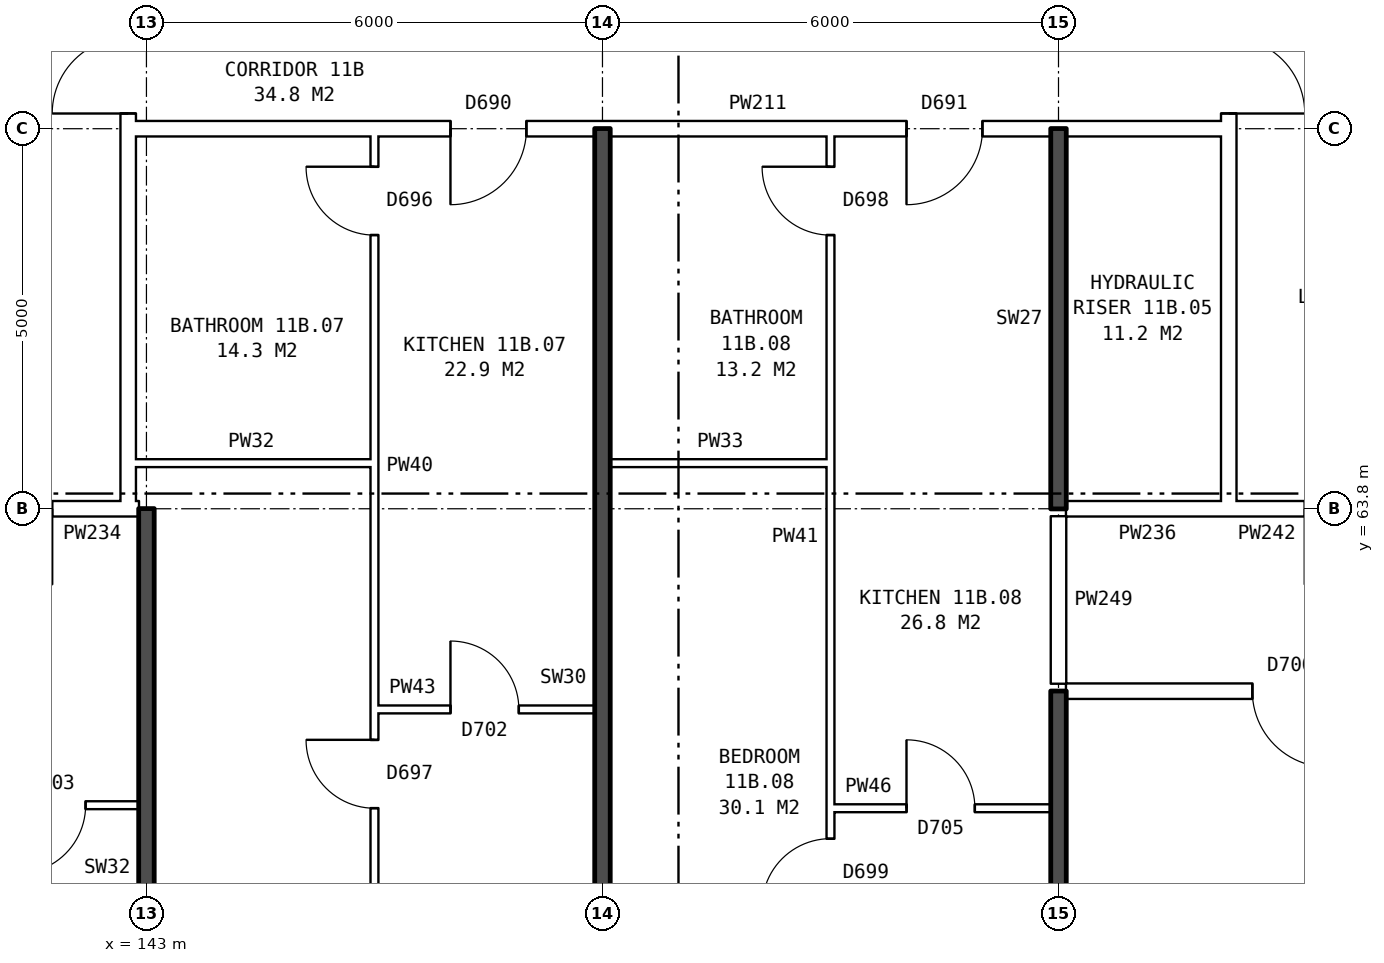
"""IFC4 building model, lengths in metres.
Left out: names, types, materials, properties, quantities, classifications, styles, units other than length and angle.
Written with IfcOpenShell. Run it as: python <this file> out.ifc"""

import sys

from ifc_helpers import new_model, si_unit, direction, frame, frame_2d, origin, place, context, subcontext, project, spatial, rectangle, extrude, element, fill, save


model = new_model("IFC4")
c1 = context("Model", 3, precision=1e-05, world=origin(), true_north=direction((0.0, 1.0)))
c2 = subcontext(c1, "Body", "Model", "MODEL_VIEW")
j1 = project(units=[si_unit("LENGTHUNIT", "METRE"), si_unit("PLANEANGLEUNIT", "RADIAN")], contexts=[c1])
p1 = place(None, origin())
s1 = spatial("IfcSite", under=j1, at=p1, CompositionType="ELEMENT")
p2 = place(p1, origin())
s2 = spatial("IfcBuilding", under=s1, at=p2, CompositionType="ELEMENT")
p3 = place(p2, frame((0.0, 0.0, 44.3)))
s3 = spatial("IfcBuildingStorey", under=s2, at=p3, CompositionType="ELEMENT", Elevation=44.3)
p4 = place(p3, frame((142.76, 63.9, 0.0), z_axis=(0.0, 0.0, 1.0), x_axis=(0.0, 1.0, 0.0)))
e1 = element("IfcWall", 1, at=p4, inside=s3, PredefinedType="PARTITIONING", context=c2, shape_type="SweptSolid", body=[
    extrude(rectangle(XDim=12.2, YDim=0.2, at=frame_2d((6.1, 0.0))), origin(), (0.0, 0.0, 1.0), 2.85),
])
p5 = place(p4, frame((5.1, 0.0, 0.0)))
e2 = element("IfcOpeningElement", 2, at=p5, cuts=e1, PredefinedType="OPENING", context=c2, shape_type="SweptSolid", body=[
    extrude(rectangle(XDim=2.0, YDim=2.1, at=frame_2d((1.0, 1.05))), frame((0.0, 0.11, 0.0), z_axis=(0.0, -1.0, 0.0), x_axis=(1.0, 0.0, 0.0)), (0.0, 0.0, 1.0), 0.22),
])
p6 = place(p3, frame((157.24, 63.9, 0.0), z_axis=(0.0, 0.0, 1.0), x_axis=(0.0, 1.0, 0.0)))
e3 = element("IfcWall", 3, at=p6, inside=s3, PredefinedType="PARTITIONING", context=c2, shape_type="SweptSolid", body=[
    extrude(rectangle(XDim=12.2, YDim=0.2, at=frame_2d((6.1, 0.0))), origin(), (0.0, 0.0, 1.0), 2.85),
])
p7 = place(p6, frame((5.1, 0.0, 0.0)))
e4 = element("IfcOpeningElement", 4, at=p7, cuts=e3, PredefinedType="OPENING", context=c2, shape_type="SweptSolid", body=[
    extrude(rectangle(XDim=2.0, YDim=2.1, at=frame_2d((1.0, 1.05))), frame((0.0, 0.11, 0.0), z_axis=(0.0, -1.0, 0.0), x_axis=(1.0, 0.0, 0.0)), (0.0, 0.0, 1.0), 0.22),
])
p8 = place(p3, frame((152.0, 59.86, 0.0), z_axis=(0.0, 0.0, 1.0), x_axis=(1.0, 0.0, 0.0)))
e5 = element("IfcWall", 5, at=p8, inside=s3, PredefinedType="PARTITIONING", context=c2, shape_type="SweptSolid", body=[
    extrude(rectangle(XDim=2.9, YDim=0.1, at=frame_2d((1.45, 0.0))), origin(), (0.0, 0.0, 1.0), 2.85),
])
p9 = place(p8, frame((1.0, 0.0, 0.0)))
e6 = element("IfcOpeningElement", 6, at=p9, cuts=e5, PredefinedType="OPENING", context=c2, shape_type="SweptSolid", body=[
    extrude(rectangle(XDim=0.9, YDim=2.1, at=frame_2d((0.45, 1.05))), frame((0.0, 0.06, 0.0), z_axis=(0.0, -1.0, 0.0), x_axis=(1.0, 0.0, 0.0)), (0.0, 0.0, 1.0), 0.12),
])
p10 = place(p3, frame((137.1, 59.9, 0.0), z_axis=(0.0, 0.0, 1.0), x_axis=(1.0, 0.0, 0.0)))
e7 = element("IfcWall", 7, at=p10, inside=s3, PredefinedType="PARTITIONING", context=c2, shape_type="SweptSolid", body=[
    extrude(rectangle(XDim=5.8, YDim=0.1, at=frame_2d((2.9, 0.0))), origin(), (0.0, 0.0, 1.0), 2.85),
])
p11 = place(p10, frame((1.3, 0.0, 0.0)))
e8 = element("IfcOpeningElement", 8, at=p11, cuts=e7, PredefinedType="OPENING", context=c2, shape_type="SweptSolid", body=[
    extrude(rectangle(XDim=0.9, YDim=2.1, at=frame_2d((0.45, 1.05))), frame((0.0, 0.06, 0.0), z_axis=(0.0, -1.0, 0.0), x_axis=(1.0, 0.0, 0.0)), (0.0, 0.0, 1.0), 0.12),
])
p12 = place(p10, frame((4.2, 0.0, 0.0)))
e9 = element("IfcOpeningElement", 9, at=p12, cuts=e7, PredefinedType="OPENING", context=c2, shape_type="SweptSolid", body=[
    extrude(rectangle(XDim=0.9, YDim=2.1, at=frame_2d((0.45, 1.05))), frame((0.0, 0.06, 0.0), z_axis=(0.0, -1.0, 0.0), x_axis=(1.0, 0.0, 0.0)), (0.0, 0.0, 1.0), 0.12),
])
p13 = place(p3, frame((146.0, 61.16, 0.0), z_axis=(0.0, 0.0, 1.0), x_axis=(1.0, 0.0, 0.0)))
e10 = element("IfcWall", 10, at=p13, inside=s3, PredefinedType="PARTITIONING", context=c2, shape_type="SweptSolid", body=[
    extrude(rectangle(XDim=2.9, YDim=0.1, at=frame_2d((1.45, 0.0))), origin(), (0.0, 0.0, 1.0), 2.85),
])
p14 = place(p13, frame((1.0, 0.0, 0.0)))
e11 = element("IfcOpeningElement", 11, at=p14, cuts=e10, PredefinedType="OPENING", context=c2, shape_type="SweptSolid", body=[
    extrude(rectangle(XDim=0.9, YDim=2.1, at=frame_2d((0.45, 1.05))), frame((0.0, 0.06, 0.0), z_axis=(0.0, -1.0, 0.0), x_axis=(1.0, 0.0, 0.0)), (0.0, 0.0, 1.0), 0.12),
])
p15 = place(p3, frame((155.1, 61.4, 0.0), z_axis=(0.0, 0.0, 1.0), x_axis=(1.0, 0.0, 0.0)))
e12 = element("IfcWall", 12, at=p15, inside=s3, PredefinedType="PARTITIONING", context=c2, shape_type="SweptSolid", body=[
    extrude(rectangle(XDim=21.04, YDim=0.2, at=frame_2d((10.52, 0.0))), origin(), (0.0, 0.0, 1.0), 2.85),
])
p16 = place(p15, frame((2.45, 0.0, 0.0)))
e13 = element("IfcOpeningElement", 13, at=p16, cuts=e12, PredefinedType="OPENING", context=c2, shape_type="SweptSolid", body=[
    extrude(rectangle(XDim=1.0, YDim=2.1, at=frame_2d((0.5, 1.05))), frame((0.0, 0.11, 0.0), z_axis=(0.0, -1.0, 0.0), x_axis=(1.0, 0.0, 0.0)), (0.0, 0.0, 1.0), 0.22),
])
p17 = place(p15, frame((14.4, 0.0, 0.0)))
e14 = element("IfcOpeningElement", 14, at=p17, cuts=e12, PredefinedType="OPENING", context=c2, shape_type="SweptSolid", body=[
    extrude(rectangle(XDim=1.0, YDim=2.1, at=frame_2d((0.5, 1.05))), frame((0.0, 0.11, 0.0), z_axis=(0.0, -1.0, 0.0), x_axis=(1.0, 0.0, 0.0)), (0.0, 0.0, 1.0), 0.22),
])
p18 = place(p3, frame((139.76, 63.8, 0.0), z_axis=(0.0, 0.0, 1.0), x_axis=(1.0, 0.0, 0.0)))
e15 = element("IfcWall", 15, at=p18, inside=s3, PredefinedType="PARTITIONING", context=c2, shape_type="SweptSolid", body=[
    extrude(rectangle(XDim=3.0, YDim=0.2, at=frame_2d((1.5, 0.0))), origin(), (0.0, 0.0, 1.0), 2.85),
])
p19 = place(p18, frame((1.0, 0.0, 0.0)))
e16 = element("IfcOpeningElement", 16, at=p19, cuts=e15, PredefinedType="OPENING", context=c2, shape_type="SweptSolid", body=[
    extrude(rectangle(XDim=1.0, YDim=2.1, at=frame_2d((0.5, 1.05))), frame((0.0, 0.11, 0.0), z_axis=(0.0, -1.0, 0.0), x_axis=(1.0, 0.0, 0.0)), (0.0, 0.0, 1.0), 0.22),
])
p20 = place(p3, frame((142.76, 63.8, 0.0), z_axis=(0.0, 0.0, 1.0), x_axis=(1.0, 0.0, 0.0)))
e17 = element("IfcWall", 17, at=p20, inside=s3, PredefinedType="PARTITIONING", context=c2, shape_type="SweptSolid", body=[
    extrude(rectangle(XDim=0.14, YDim=0.2, at=frame_2d((0.07, 0.0))), origin(), (0.0, 0.0, 1.0), 2.85),
])
p21 = place(p3, frame((155.1, 63.8, 0.0), z_axis=(0.0, 0.0, 1.0), x_axis=(1.0, 0.0, 0.0)))
e18 = element("IfcWall", 18, at=p21, inside=s3, PredefinedType="PARTITIONING", context=c2, shape_type="SweptSolid", body=[
    extrude(rectangle(XDim=2.14, YDim=0.2, at=frame_2d((1.07, 0.0))), origin(), (0.0, 0.0, 1.0), 2.85),
])
p22 = place(p3, frame((157.24, 63.8, 0.0), z_axis=(0.0, 0.0, 1.0), x_axis=(1.0, 0.0, 0.0)))
e19 = element("IfcWall", 19, at=p22, inside=s3, PredefinedType="PARTITIONING", context=c2, shape_type="SweptSolid", body=[
    extrude(rectangle(XDim=3.0, YDim=0.2, at=frame_2d((1.5, 0.0))), origin(), (0.0, 0.0, 1.0), 2.85),
])
p23 = place(p22, frame((1.0, 0.0, 0.0)))
e20 = element("IfcOpeningElement", 20, at=p23, cuts=e19, PredefinedType="OPENING", context=c2, shape_type="SweptSolid", body=[
    extrude(rectangle(XDim=1.0, YDim=2.1, at=frame_2d((0.5, 1.05))), frame((0.0, 0.11, 0.0), z_axis=(0.0, -1.0, 0.0), x_axis=(1.0, 0.0, 0.0)), (0.0, 0.0, 1.0), 0.22),
])
p24 = place(p3, frame((142.76, 64.4, 0.0), z_axis=(0.0, 0.0, 1.0), x_axis=(1.0, 0.0, 0.0)))
e21 = element("IfcWall", 21, at=p24, inside=s3, PredefinedType="PARTITIONING", context=c2, shape_type="SweptSolid", body=[
    extrude(rectangle(XDim=3.24, YDim=0.1, at=frame_2d((1.62, 0.0))), origin(), (0.0, 0.0, 1.0), 2.85),
])
p25 = place(p3, frame((149.1, 64.4, 0.0), z_axis=(0.0, 0.0, 1.0), x_axis=(1.0, 0.0, 0.0)))
e22 = element("IfcWall", 22, at=p25, inside=s3, PredefinedType="PARTITIONING", context=c2, shape_type="SweptSolid", body=[
    extrude(rectangle(XDim=2.9, YDim=0.1, at=frame_2d((1.45, 0.0))), origin(), (0.0, 0.0, 1.0), 2.85),
])
p26 = place(p3, frame((142.76, 68.8, 0.0), z_axis=(0.0, 0.0, 1.0), x_axis=(1.0, 0.0, 0.0)))
e23 = element("IfcWall", 23, at=p26, inside=s3, PredefinedType="PARTITIONING", context=c2, shape_type="SweptSolid", body=[
    extrude(rectangle(XDim=14.48, YDim=0.2, at=frame_2d((7.24, 0.0))), origin(), (0.0, 0.0, 1.0), 2.85),
])
p27 = place(p26, frame((4.24, 0.0, 0.0)))
e24 = element("IfcOpeningElement", 24, at=p27, cuts=e23, PredefinedType="OPENING", context=c2, shape_type="SweptSolid", body=[
    extrude(rectangle(XDim=1.0, YDim=2.1, at=frame_2d((0.5, 1.05))), frame((0.0, 0.11, 0.0), z_axis=(0.0, -1.0, 0.0), x_axis=(1.0, 0.0, 0.0)), (0.0, 0.0, 1.0), 0.22),
])
p28 = place(p26, frame((10.24, 0.0, 0.0)))
e25 = element("IfcOpeningElement", 25, at=p28, cuts=e23, PredefinedType="OPENING", context=c2, shape_type="SweptSolid", body=[
    extrude(rectangle(XDim=1.0, YDim=2.1, at=frame_2d((0.5, 1.05))), frame((0.0, 0.11, 0.0), z_axis=(0.0, -1.0, 0.0), x_axis=(1.0, 0.0, 0.0)), (0.0, 0.0, 1.0), 0.22),
])
p29 = place(p3, frame((143.0, 54.36, 0.0), z_axis=(0.0, 0.0, 1.0), x_axis=(0.0, 1.0, 0.0)))
e26 = element("IfcWall", 26, at=p29, inside=s3, PredefinedType="SOLIDWALL", context=c2, shape_type="SweptSolid", body=[
    extrude(rectangle(XDim=9.44, YDim=0.2, at=frame_2d((4.72, 0.0))), origin(), (0.0, 0.0, 1.0), 2.85),
])
p30 = place(p3, frame((146.0, 54.36, 0.0), z_axis=(0.0, 0.0, 1.0), x_axis=(0.0, 1.0, 0.0)))
e27 = element("IfcWall", 27, at=p30, inside=s3, PredefinedType="PARTITIONING", context=c2, shape_type="SweptSolid", body=[
    extrude(rectangle(XDim=14.34, YDim=0.1, at=frame_2d((7.17, 0.0))), origin(), (0.0, 0.0, 1.0), 2.85),
])
p31 = place(p30, frame((5.5, 0.0, 0.0)))
e28 = element("IfcOpeningElement", 28, at=p31, cuts=e27, PredefinedType="OPENING", context=c2, shape_type="SweptSolid", body=[
    extrude(rectangle(XDim=0.9, YDim=2.1, at=frame_2d((0.45, 1.05))), frame((0.0, 0.06, 0.0), z_axis=(0.0, -1.0, 0.0), x_axis=(1.0, 0.0, 0.0)), (0.0, 0.0, 1.0), 0.12),
])
p32 = place(p30, frame((13.04, 0.0, 0.0)))
e29 = element("IfcOpeningElement", 29, at=p32, cuts=e27, PredefinedType="OPENING", context=c2, shape_type="SweptSolid", body=[
    extrude(rectangle(XDim=0.9, YDim=2.1, at=frame_2d((0.45, 1.05))), frame((0.0, 0.06, 0.0), z_axis=(0.0, -1.0, 0.0), x_axis=(1.0, 0.0, 0.0)), (0.0, 0.0, 1.0), 0.12),
])
p33 = place(p3, frame((149.0, 54.36, 0.0), z_axis=(0.0, 0.0, 1.0), x_axis=(0.0, 1.0, 0.0)))
e30 = element("IfcWall", 30, at=p33, inside=s3, PredefinedType="SOLIDWALL", context=c2, shape_type="SweptSolid", body=[
    extrude(rectangle(XDim=14.44, YDim=0.2, at=frame_2d((7.22, 0.0))), origin(), (0.0, 0.0, 1.0), 2.85),
])
p34 = place(p3, frame((152.0, 54.36, 0.0), z_axis=(0.0, 0.0, 1.0), x_axis=(0.0, 1.0, 0.0)))
e31 = element("IfcWall", 31, at=p34, inside=s3, PredefinedType="PARTITIONING", context=c2, shape_type="SweptSolid", body=[
    extrude(rectangle(XDim=14.34, YDim=0.1, at=frame_2d((7.17, 0.0))), origin(), (0.0, 0.0, 1.0), 2.85),
])
p35 = place(p34, frame((4.2, 0.0, 0.0)))
e32 = element("IfcOpeningElement", 32, at=p35, cuts=e31, PredefinedType="OPENING", context=c2, shape_type="SweptSolid", body=[
    extrude(rectangle(XDim=0.9, YDim=2.1, at=frame_2d((0.45, 1.05))), frame((0.0, 0.06, 0.0), z_axis=(0.0, -1.0, 0.0), x_axis=(1.0, 0.0, 0.0)), (0.0, 0.0, 1.0), 0.12),
])
p36 = place(p34, frame((13.04, 0.0, 0.0)))
e33 = element("IfcOpeningElement", 33, at=p36, cuts=e31, PredefinedType="OPENING", context=c2, shape_type="SweptSolid", body=[
    extrude(rectangle(XDim=0.9, YDim=2.1, at=frame_2d((0.45, 1.05))), frame((0.0, 0.06, 0.0), z_axis=(0.0, -1.0, 0.0), x_axis=(1.0, 0.0, 0.0)), (0.0, 0.0, 1.0), 0.12),
])
p37 = place(p3, frame((155.0, 54.36, 0.0), z_axis=(0.0, 0.0, 1.0), x_axis=(0.0, 1.0, 0.0)))
e34 = element("IfcWall", 34, at=p37, inside=s3, PredefinedType="SOLIDWALL", context=c2, shape_type="SweptSolid", body=[
    extrude(rectangle(XDim=7.04, YDim=0.2, at=frame_2d((3.52, 0.0))), origin(), (0.0, 0.0, 1.0), 2.85),
])
p38 = place(p3, frame((155.0, 61.5, 0.0), z_axis=(0.0, 0.0, 1.0), x_axis=(0.0, 1.0, 0.0)))
e35 = element("IfcWall", 35, at=p38, inside=s3, PredefinedType="PARTITIONING", context=c2, shape_type="SweptSolid", body=[
    extrude(rectangle(XDim=2.2, YDim=0.2, at=frame_2d((1.1, 0.0))), origin(), (0.0, 0.0, 1.0), 2.85),
])
p39 = place(p3, frame((155.0, 63.8, 0.0), z_axis=(0.0, 0.0, 1.0), x_axis=(0.0, 1.0, 0.0)))
e36 = element("IfcWall", 36, at=p39, inside=s3, PredefinedType="SOLIDWALL", context=c2, shape_type="SweptSolid", body=[
    extrude(rectangle(XDim=5.0, YDim=0.2, at=frame_2d((2.5, 0.0))), origin(), (0.0, 0.0, 1.0), 2.85),
])
p40 = place(p5, origin())
e37 = element("IfcDoor", 37, at=p40, inside=s3, OperationType="DOUBLE_DOOR_SINGLE_SWING", PredefinedType="DOOR", context=c2, shape_type="SweptSolid", body=[
    extrude(rectangle(XDim=2.0, YDim=2.1, at=frame_2d((1.0, 1.05))), frame((0.0, 0.025, 0.0), z_axis=(0.0, -1.0, 0.0), x_axis=(1.0, 0.0, 0.0)), (0.0, 0.0, 1.0), 0.05),
])
fill(e2, e37)
p41 = place(p7, frame((2.0, 0.0, 0.0), z_axis=(0.0, 0.0, 1.0), x_axis=(-1.0, 0.0, 0.0)))
e38 = element("IfcDoor", 38, at=p41, inside=s3, OperationType="DOUBLE_DOOR_SINGLE_SWING", PredefinedType="DOOR", context=c2, shape_type="SweptSolid", body=[
    extrude(rectangle(XDim=2.0, YDim=2.1, at=frame_2d((1.0, 1.05))), frame((0.0, 0.025, 0.0), z_axis=(0.0, -1.0, 0.0), x_axis=(1.0, 0.0, 0.0)), (0.0, 0.0, 1.0), 0.05),
])
fill(e4, e38)
p42 = place(p12, frame((0.9, 0.0, 0.0), z_axis=(0.0, 0.0, 1.0), x_axis=(-1.0, 0.0, 0.0)))
e39 = element("IfcDoor", 39, at=p42, inside=s3, OperationType="SINGLE_SWING_RIGHT", PredefinedType="DOOR", context=c2, shape_type="SweptSolid", body=[
    extrude(rectangle(XDim=0.9, YDim=2.1, at=frame_2d((0.45, 1.05))), frame((0.0, 0.025, 0.0), z_axis=(0.0, -1.0, 0.0), x_axis=(1.0, 0.0, 0.0)), (0.0, 0.0, 1.0), 0.05),
])
fill(e9, e39)
p43 = place(p31, origin())
e40 = element("IfcDoor", 40, at=p43, inside=s3, OperationType="SINGLE_SWING_RIGHT", PredefinedType="DOOR", context=c2, shape_type="SweptSolid", body=[
    extrude(rectangle(XDim=0.9, YDim=2.1, at=frame_2d((0.45, 1.05))), frame((0.0, 0.025, 0.0), z_axis=(0.0, -1.0, 0.0), x_axis=(1.0, 0.0, 0.0)), (0.0, 0.0, 1.0), 0.05),
])
fill(e28, e40)
p44 = place(p27, frame((1.0, 0.0, 0.0), z_axis=(0.0, 0.0, 1.0), x_axis=(-1.0, 0.0, 0.0)))
e41 = element("IfcDoor", 41, at=p44, inside=s3, OperationType="SINGLE_SWING_RIGHT", PredefinedType="DOOR", context=c2, shape_type="SweptSolid", body=[
    extrude(rectangle(XDim=1.0, YDim=2.1, at=frame_2d((0.5, 1.05))), frame((0.0, 0.025, 0.0), z_axis=(0.0, -1.0, 0.0), x_axis=(1.0, 0.0, 0.0)), (0.0, 0.0, 1.0), 0.05),
])
fill(e24, e41)
p45 = place(p14, origin())
e42 = element("IfcDoor", 42, at=p45, inside=s3, OperationType="SINGLE_SWING_LEFT", PredefinedType="DOOR", context=c2, shape_type="SweptSolid", body=[
    extrude(rectangle(XDim=0.9, YDim=2.1, at=frame_2d((0.45, 1.05))), frame((0.0, 0.025, 0.0), z_axis=(0.0, -1.0, 0.0), x_axis=(1.0, 0.0, 0.0)), (0.0, 0.0, 1.0), 0.05),
])
fill(e11, e42)
p46 = place(p32, origin())
e43 = element("IfcDoor", 43, at=p46, inside=s3, OperationType="SINGLE_SWING_RIGHT", PredefinedType="DOOR", context=c2, shape_type="SweptSolid", body=[
    extrude(rectangle(XDim=0.9, YDim=2.1, at=frame_2d((0.45, 1.05))), frame((0.0, 0.025, 0.0), z_axis=(0.0, -1.0, 0.0), x_axis=(1.0, 0.0, 0.0)), (0.0, 0.0, 1.0), 0.05),
])
fill(e29, e43)
p47 = place(p35, origin())
e44 = element("IfcDoor", 44, at=p47, inside=s3, OperationType="SINGLE_SWING_LEFT", PredefinedType="DOOR", context=c2, shape_type="SweptSolid", body=[
    extrude(rectangle(XDim=0.9, YDim=2.1, at=frame_2d((0.45, 1.05))), frame((0.0, 0.025, 0.0), z_axis=(0.0, -1.0, 0.0), x_axis=(1.0, 0.0, 0.0)), (0.0, 0.0, 1.0), 0.05),
])
fill(e32, e44)
p48 = place(p28, frame((1.0, 0.0, 0.0), z_axis=(0.0, 0.0, 1.0), x_axis=(-1.0, 0.0, 0.0)))
e45 = element("IfcDoor", 45, at=p48, inside=s3, OperationType="SINGLE_SWING_RIGHT", PredefinedType="DOOR", context=c2, shape_type="SweptSolid", body=[
    extrude(rectangle(XDim=1.0, YDim=2.1, at=frame_2d((0.5, 1.05))), frame((0.0, 0.025, 0.0), z_axis=(0.0, -1.0, 0.0), x_axis=(1.0, 0.0, 0.0)), (0.0, 0.0, 1.0), 0.05),
])
fill(e25, e45)
p49 = place(p9, origin())
e46 = element("IfcDoor", 46, at=p49, inside=s3, OperationType="SINGLE_SWING_LEFT", PredefinedType="DOOR", context=c2, shape_type="SweptSolid", body=[
    extrude(rectangle(XDim=0.9, YDim=2.1, at=frame_2d((0.45, 1.05))), frame((0.0, 0.025, 0.0), z_axis=(0.0, -1.0, 0.0), x_axis=(1.0, 0.0, 0.0)), (0.0, 0.0, 1.0), 0.05),
])
fill(e6, e46)
p50 = place(p36, origin())
e47 = element("IfcDoor", 47, at=p50, inside=s3, OperationType="SINGLE_SWING_RIGHT", PredefinedType="DOOR", context=c2, shape_type="SweptSolid", body=[
    extrude(rectangle(XDim=0.9, YDim=2.1, at=frame_2d((0.45, 1.05))), frame((0.0, 0.025, 0.0), z_axis=(0.0, -1.0, 0.0), x_axis=(1.0, 0.0, 0.0)), (0.0, 0.0, 1.0), 0.05),
])
fill(e33, e47)
p51 = place(p16, frame((1.0, 0.0, 0.0), z_axis=(0.0, 0.0, 1.0), x_axis=(-1.0, 0.0, 0.0)))
e48 = element("IfcDoor", 48, at=p51, inside=s3, OperationType="SINGLE_SWING_LEFT", PredefinedType="DOOR", context=c2, shape_type="SweptSolid", body=[
    extrude(rectangle(XDim=1.0, YDim=2.1, at=frame_2d((0.5, 1.05))), frame((0.0, 0.025, 0.0), z_axis=(0.0, -1.0, 0.0), x_axis=(1.0, 0.0, 0.0)), (0.0, 0.0, 1.0), 0.05),
])
fill(e13, e48)
save(model, sys.argv[1])
